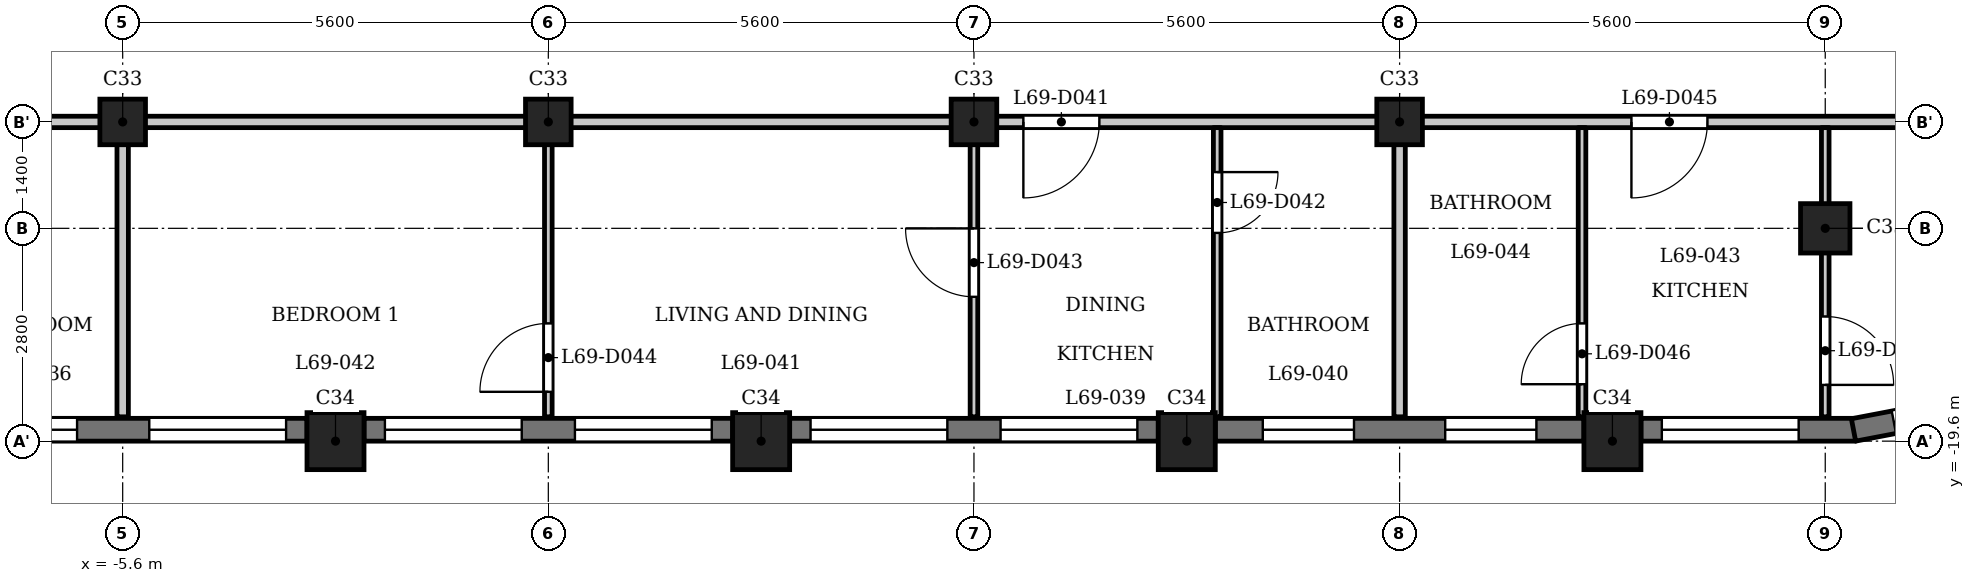
"""IFC4 building model, lengths in metres.
Left out: names, types, materials, properties, quantities, classifications, styles, units other than length and angle.
Written with IfcOpenShell. Run it as: python <this file> out.ifc"""

import sys

from ifc_helpers import new_model, si_unit, direction, frame, frame_2d, origin, origin_2d, place, context, subcontext, project, spatial, rectangle, extrude, element, fill, save


model = new_model("IFC4")
c1 = context("Model", 3, precision=1e-05, world=origin(), true_north=direction((0.0, 1.0)))
c2 = subcontext(c1, "Body", "Model", "MODEL_VIEW")
j1 = project(units=[si_unit("LENGTHUNIT", "METRE"), si_unit("PLANEANGLEUNIT", "RADIAN")], contexts=[c1])
p1 = place(None, origin())
s1 = spatial("IfcSite", under=j1, at=p1, CompositionType="ELEMENT")
p2 = place(p1, origin())
s2 = spatial("IfcBuilding", under=s1, at=p2, CompositionType="ELEMENT")
p3 = place(p2, frame((0.0, 0.0, 266.2)))
s3 = spatial("IfcBuildingStorey", under=s2, at=p3, CompositionType="ELEMENT", Elevation=266.2)
for number, where, z_axis, x_axis in (
    (1, (-2.8, -19.6, 0.0), (0.0, 0.0, 1.0), (1.0, 0.0, 0.0)),
    (2, (2.8, -19.6, 0.0), (0.0, 0.0, 1.0), (1.0, 0.0, 0.0)),
    (3, (8.4, -19.6, 0.0), (0.0, 0.0, 1.0), (1.0, 0.0, 0.0)),
    (4, (14.0, -19.6, 0.0), (0.0, 0.0, 1.0), (1.0, 0.0, 0.0)),
):
    element("IfcColumn", number, at=place(p3, frame(where, z_axis=z_axis, x_axis=x_axis)), inside=s3, PredefinedType="COLUMN", context=c2, shape_type="SweptSolid", body=[
        extrude(rectangle(XDim=0.75, YDim=0.75, at=origin_2d()), origin(), (0.0, 0.0, 1.0), 3.5),
    ])
p4 = place(p3, frame((16.8, -16.8, 0.0), z_axis=(0.0, 0.0, 1.0), x_axis=(1.0, 0.0, 0.0)))
e5 = element("IfcColumn", 5, at=p4, inside=s3, PredefinedType="COLUMN", context=c2, shape_type="SweptSolid", body=[
    extrude(rectangle(XDim=0.65, YDim=0.65, at=origin_2d()), origin(), (0.0, 0.0, 1.0), 3.5),
])
for number, where, z_axis, x_axis in (
    (6, (-5.6, -15.4, 0.0), (0.0, 0.0, 1.0), (1.0, 0.0, 0.0)),
    (7, (0.0, -15.4, 0.0), (0.0, 0.0, 1.0), (1.0, 0.0, 0.0)),
    (8, (5.6, -15.4, 0.0), (0.0, 0.0, 1.0), (1.0, 0.0, 0.0)),
    (9, (11.2, -15.4, 0.0), (0.0, 0.0, 1.0), (1.0, 0.0, 0.0)),
):
    element("IfcColumn", number, at=place(p3, frame(where, z_axis=z_axis, x_axis=x_axis)), inside=s3, PredefinedType="COLUMN", context=c2, shape_type="SweptSolid", body=[
        extrude(rectangle(XDim=0.6, YDim=0.6, at=origin_2d()), origin(), (0.0, 0.0, 1.0), 3.5),
    ])
p5 = place(p3, frame((-8.025, -19.45, 0.0), z_axis=(0.0, 0.0, 1.0), x_axis=(1.0, 0.0, 0.0)))
e10 = element("IfcWall", 10, at=p5, inside=s3, PredefinedType="SOLIDWALL", context=c2, shape_type="SweptSolid", body=[
    extrude(rectangle(XDim=4.85, YDim=0.3, at=frame_2d((2.425, 0.0))), origin(), (0.0, 0.0, 1.0), 2.55),
])
p6 = place(p5, frame((0.625, 0.0, 0.6)))
e11 = element("IfcOpeningElement", 11, at=p6, cuts=e10, PredefinedType="OPENING", context=c2, shape_type="SweptSolid", body=[
    extrude(rectangle(XDim=1.2, YDim=1.55, at=frame_2d((0.6, 0.775))), frame((0.0, 0.16, 0.0), z_axis=(0.0, -1.0, 0.0), x_axis=(1.0, 0.0, 0.0)), (0.0, 0.0, 1.0), 0.32),
])
p7 = place(p5, frame((2.775, 0.0, 0.9)))
e12 = element("IfcOpeningElement", 12, at=p7, cuts=e10, PredefinedType="OPENING", context=c2, shape_type="SweptSolid", body=[
    extrude(rectangle(XDim=1.8, YDim=1.25, at=frame_2d((0.9, 0.625))), frame((0.0, 0.16, 0.0), z_axis=(0.0, -1.0, 0.0), x_axis=(1.0, 0.0, 0.0)), (0.0, 0.0, 1.0), 0.32),
])
p8 = place(p3, frame((-2.425, -19.45, 0.0), z_axis=(0.0, 0.0, 1.0), x_axis=(1.0, 0.0, 0.0)))
e13 = element("IfcWall", 13, at=p8, inside=s3, PredefinedType="SOLIDWALL", context=c2, shape_type="SweptSolid", body=[
    extrude(rectangle(XDim=4.85, YDim=0.3, at=frame_2d((2.425, 0.0))), origin(), (0.0, 0.0, 1.0), 2.55),
])
p9 = place(p8, frame((0.275, 0.0, 0.9)))
e14 = element("IfcOpeningElement", 14, at=p9, cuts=e13, PredefinedType="OPENING", context=c2, shape_type="SweptSolid", body=[
    extrude(rectangle(XDim=1.8, YDim=1.25, at=frame_2d((0.9, 0.625))), frame((0.0, 0.16, 0.0), z_axis=(0.0, -1.0, 0.0), x_axis=(1.0, 0.0, 0.0)), (0.0, 0.0, 1.0), 0.32),
])
p10 = place(p8, frame((2.775, 0.0, 0.9)))
e15 = element("IfcOpeningElement", 15, at=p10, cuts=e13, PredefinedType="OPENING", context=c2, shape_type="SweptSolid", body=[
    extrude(rectangle(XDim=1.8, YDim=1.25, at=frame_2d((0.9, 0.625))), frame((0.0, 0.16, 0.0), z_axis=(0.0, -1.0, 0.0), x_axis=(1.0, 0.0, 0.0)), (0.0, 0.0, 1.0), 0.32),
])
p11 = place(p3, frame((3.175, -19.45, 0.0), z_axis=(0.0, 0.0, 1.0), x_axis=(1.0, 0.0, 0.0)))
e16 = element("IfcWall", 16, at=p11, inside=s3, PredefinedType="SOLIDWALL", context=c2, shape_type="SweptSolid", body=[
    extrude(rectangle(XDim=4.85, YDim=0.3, at=frame_2d((2.425, 0.0))), origin(), (0.0, 0.0, 1.0), 2.55),
])
p12 = place(p11, frame((0.275, 0.0, 0.9)))
e17 = element("IfcOpeningElement", 17, at=p12, cuts=e16, PredefinedType="OPENING", context=c2, shape_type="SweptSolid", body=[
    extrude(rectangle(XDim=1.8, YDim=1.25, at=frame_2d((0.9, 0.625))), frame((0.0, 0.16, 0.0), z_axis=(0.0, -1.0, 0.0), x_axis=(1.0, 0.0, 0.0)), (0.0, 0.0, 1.0), 0.32),
])
p13 = place(p11, frame((2.775, 0.0, 0.9)))
e18 = element("IfcOpeningElement", 18, at=p13, cuts=e16, PredefinedType="OPENING", context=c2, shape_type="SweptSolid", body=[
    extrude(rectangle(XDim=1.8, YDim=1.25, at=frame_2d((0.9, 0.625))), frame((0.0, 0.16, 0.0), z_axis=(0.0, -1.0, 0.0), x_axis=(1.0, 0.0, 0.0)), (0.0, 0.0, 1.0), 0.32),
])
p14 = place(p3, frame((8.775, -19.45, 0.0), z_axis=(0.0, 0.0, 1.0), x_axis=(1.0, 0.0, 0.0)))
e19 = element("IfcWall", 19, at=p14, inside=s3, PredefinedType="SOLIDWALL", context=c2, shape_type="SweptSolid", body=[
    extrude(rectangle(XDim=4.85, YDim=0.3, at=frame_2d((2.425, 0.0))), origin(), (0.0, 0.0, 1.0), 2.55),
])
p15 = place(p14, frame((0.625, 0.0, 0.6)))
e20 = element("IfcOpeningElement", 20, at=p15, cuts=e19, PredefinedType="OPENING", context=c2, shape_type="SweptSolid", body=[
    extrude(rectangle(XDim=1.2, YDim=1.55, at=frame_2d((0.6, 0.775))), frame((0.0, 0.16, 0.0), z_axis=(0.0, -1.0, 0.0), x_axis=(1.0, 0.0, 0.0)), (0.0, 0.0, 1.0), 0.32),
])
p16 = place(p14, frame((3.025, 0.0, 0.6)))
e21 = element("IfcOpeningElement", 21, at=p16, cuts=e19, PredefinedType="OPENING", context=c2, shape_type="SweptSolid", body=[
    extrude(rectangle(XDim=1.2, YDim=1.55, at=frame_2d((0.6, 0.775))), frame((0.0, 0.16, 0.0), z_axis=(0.0, -1.0, 0.0), x_axis=(1.0, 0.0, 0.0)), (0.0, 0.0, 1.0), 0.32),
])
p17 = place(p3, frame((14.375, -19.45, 0.0), z_axis=(0.0, 0.0, 1.0), x_axis=(1.0, 0.0, 0.0)))
e22 = element("IfcWall", 22, at=p17, inside=s3, PredefinedType="SOLIDWALL", context=c2, shape_type="SweptSolid", body=[
    extrude(rectangle(XDim=2.825, YDim=0.3, at=frame_2d((1.413, 0.0))), origin(), (0.0, 0.0, 1.0), 2.55),
])
p18 = place(p17, frame((0.275, 0.0, 0.9)))
e23 = element("IfcOpeningElement", 23, at=p18, cuts=e22, PredefinedType="OPENING", context=c2, shape_type="SweptSolid", body=[
    extrude(rectangle(XDim=1.8, YDim=1.25, at=frame_2d((0.9, 0.625))), frame((0.0, 0.16, 0.0), z_axis=(0.0, -1.0, 0.0), x_axis=(1.0, 0.0, 0.0)), (0.0, 0.0, 1.0), 0.32),
])
p19 = place(p3, frame((17.172, -19.453, 0.0), z_axis=(0.0, 0.0, 1.0), x_axis=(0.982284001233, 0.187398348234, 0.0)))
e24 = element("IfcWall", 24, at=p19, inside=s3, PredefinedType="SOLIDWALL", context=c2, shape_type="SweptSolid", body=[
    extrude(rectangle(XDim=1.881, YDim=0.3, at=frame_2d((0.941, 0.0))), origin(), (0.0, 0.0, 1.0), 2.55),
])
p20 = place(p19, frame((0.541, 0.0, 0.6)))
e25 = element("IfcOpeningElement", 25, at=p20, cuts=e24, PredefinedType="OPENING", context=c2, shape_type="SweptSolid", body=[
    extrude(rectangle(XDim=0.8, YDim=1.55, at=frame_2d((0.4, 0.775))), frame((0.0, 0.16, 0.0), z_axis=(0.0, -1.0, 0.0), x_axis=(1.0, 0.0, 0.0)), (0.0, 0.0, 1.0), 0.32),
])
p21 = place(p3, frame((-23.322, -15.4, 0.0), z_axis=(0.0, 0.0, 1.0), x_axis=(1.0, 0.0, 0.0)))
e26 = element("IfcWall", 26, at=p21, inside=s3, PredefinedType="PARTITIONING", context=c2, shape_type="SweptSolid", body=[
    extrude(rectangle(XDim=46.872, YDim=0.15, at=frame_2d((23.436, 0.0))), origin(), (0.0, 0.0, 1.0), 3.2),
])
p22 = place(p21, frame((12.772, 0.0, 0.0)))
e27 = element("IfcOpeningElement", 27, at=p22, cuts=e26, PredefinedType="OPENING", context=c2, shape_type="SweptSolid", body=[
    extrude(rectangle(XDim=1.0, YDim=2.1, at=frame_2d((0.5, 1.05))), frame((0.0, 0.085, 0.0), z_axis=(0.0, -1.0, 0.0), x_axis=(1.0, 0.0, 0.0)), (0.0, 0.0, 1.0), 0.17),
])
p23 = place(p21, frame((29.572, 0.0, 0.0)))
e28 = element("IfcOpeningElement", 28, at=p23, cuts=e26, PredefinedType="OPENING", context=c2, shape_type="SweptSolid", body=[
    extrude(rectangle(XDim=1.0, YDim=2.1, at=frame_2d((0.5, 1.05))), frame((0.0, 0.085, 0.0), z_axis=(0.0, -1.0, 0.0), x_axis=(1.0, 0.0, 0.0)), (0.0, 0.0, 1.0), 0.17),
])
p24 = place(p21, frame((37.572, 0.0, 0.0)))
e29 = element("IfcOpeningElement", 29, at=p24, cuts=e26, PredefinedType="OPENING", context=c2, shape_type="SweptSolid", body=[
    extrude(rectangle(XDim=1.0, YDim=2.1, at=frame_2d((0.5, 1.05))), frame((0.0, 0.085, 0.0), z_axis=(0.0, -1.0, 0.0), x_axis=(1.0, 0.0, 0.0)), (0.0, 0.0, 1.0), 0.17),
])
p25 = place(p3, frame((-5.6, -19.28, 0.0), z_axis=(0.0, 0.0, 1.0), x_axis=(0.0, 1.0, 0.0)))
e30 = element("IfcWall", 30, at=p25, inside=s3, PredefinedType="PARTITIONING", context=c2, shape_type="SweptSolid", body=[
    extrude(rectangle(XDim=3.805, YDim=0.15, at=frame_2d((1.902, 0.0))), origin(), (0.0, 0.0, 1.0), 3.2),
])
p26 = place(p3, frame((0.0, -19.28, 0.0), z_axis=(0.0, 0.0, 1.0), x_axis=(0.0, 1.0, 0.0)))
e31 = element("IfcWall", 31, at=p26, inside=s3, PredefinedType="PARTITIONING", context=c2, shape_type="SweptSolid", body=[
    extrude(rectangle(XDim=3.805, YDim=0.1, at=frame_2d((1.902, 0.0))), origin(), (0.0, 0.0, 1.0), 3.2),
])
p27 = place(p26, frame((0.329, 0.0, 0.0)))
e32 = element("IfcOpeningElement", 32, at=p27, cuts=e31, PredefinedType="OPENING", context=c2, shape_type="SweptSolid", body=[
    extrude(rectangle(XDim=0.9, YDim=2.1, at=frame_2d((0.45, 1.05))), frame((0.0, 0.06, 0.0), z_axis=(0.0, -1.0, 0.0), x_axis=(1.0, 0.0, 0.0)), (0.0, 0.0, 1.0), 0.12),
])
p28 = place(p3, frame((5.6, -19.28, 0.0), z_axis=(0.0, 0.0, 1.0), x_axis=(0.0, 1.0, 0.0)))
e33 = element("IfcWall", 33, at=p28, inside=s3, PredefinedType="PARTITIONING", context=c2, shape_type="SweptSolid", body=[
    extrude(rectangle(XDim=3.805, YDim=0.1, at=frame_2d((1.902, 0.0))), origin(), (0.0, 0.0, 1.0), 3.2),
])
p29 = place(p28, frame((1.579, 0.0, 0.0)))
e34 = element("IfcOpeningElement", 34, at=p29, cuts=e33, PredefinedType="OPENING", context=c2, shape_type="SweptSolid", body=[
    extrude(rectangle(XDim=0.9, YDim=2.1, at=frame_2d((0.45, 1.05))), frame((0.0, 0.06, 0.0), z_axis=(0.0, -1.0, 0.0), x_axis=(1.0, 0.0, 0.0)), (0.0, 0.0, 1.0), 0.12),
])
p30 = place(p3, frame((8.8, -19.28, 0.0), z_axis=(0.0, 0.0, 1.0), x_axis=(0.0, 1.0, 0.0)))
e35 = element("IfcWall", 35, at=p30, inside=s3, PredefinedType="PARTITIONING", context=c2, shape_type="SweptSolid", body=[
    extrude(rectangle(XDim=3.805, YDim=0.1, at=frame_2d((1.902, 0.0))), origin(), (0.0, 0.0, 1.0), 3.2),
])
p31 = place(p30, frame((2.42, 0.0, 0.0)))
e36 = element("IfcOpeningElement", 36, at=p31, cuts=e35, PredefinedType="OPENING", context=c2, shape_type="SweptSolid", body=[
    extrude(rectangle(XDim=0.8, YDim=2.1, at=frame_2d((0.4, 1.05))), frame((0.0, 0.06, 0.0), z_axis=(0.0, -1.0, 0.0), x_axis=(1.0, 0.0, 0.0)), (0.0, 0.0, 1.0), 0.12),
])
p32 = place(p3, frame((11.2, -19.28, 0.0), z_axis=(0.0, 0.0, 1.0), x_axis=(0.0, 1.0, 0.0)))
e37 = element("IfcWall", 37, at=p32, inside=s3, PredefinedType="PARTITIONING", context=c2, shape_type="SweptSolid", body=[
    extrude(rectangle(XDim=3.805, YDim=0.15, at=frame_2d((1.902, 0.0))), origin(), (0.0, 0.0, 1.0), 3.2),
])
p33 = place(p3, frame((13.6, -19.28, 0.0), z_axis=(0.0, 0.0, 1.0), x_axis=(0.0, 1.0, 0.0)))
e38 = element("IfcWall", 38, at=p33, inside=s3, PredefinedType="PARTITIONING", context=c2, shape_type="SweptSolid", body=[
    extrude(rectangle(XDim=3.805, YDim=0.1, at=frame_2d((1.902, 0.0))), origin(), (0.0, 0.0, 1.0), 3.2),
])
p34 = place(p33, frame((0.429, 0.0, 0.0)))
e39 = element("IfcOpeningElement", 39, at=p34, cuts=e38, PredefinedType="OPENING", context=c2, shape_type="SweptSolid", body=[
    extrude(rectangle(XDim=0.8, YDim=2.1, at=frame_2d((0.4, 1.05))), frame((0.0, 0.06, 0.0), z_axis=(0.0, -1.0, 0.0), x_axis=(1.0, 0.0, 0.0)), (0.0, 0.0, 1.0), 0.12),
])
p35 = place(p3, frame((16.8, -19.28, 0.0), z_axis=(0.0, 0.0, 1.0), x_axis=(0.0, 1.0, 0.0)))
e40 = element("IfcWall", 40, at=p35, inside=s3, PredefinedType="PARTITIONING", context=c2, shape_type="SweptSolid", body=[
    extrude(rectangle(XDim=3.805, YDim=0.1, at=frame_2d((1.902, 0.0))), origin(), (0.0, 0.0, 1.0), 3.2),
])
p36 = place(p35, frame((0.42, 0.0, 0.0)))
e41 = element("IfcOpeningElement", 41, at=p36, cuts=e40, PredefinedType="OPENING", context=c2, shape_type="SweptSolid", body=[
    extrude(rectangle(XDim=0.9, YDim=2.1, at=frame_2d((0.45, 1.05))), frame((0.0, 0.06, 0.0), z_axis=(0.0, -1.0, 0.0), x_axis=(1.0, 0.0, 0.0)), (0.0, 0.0, 1.0), 0.12),
])
p37 = place(p23, origin())
e42 = element("IfcDoor", 42, at=p37, inside=s3, OperationType="SINGLE_SWING_LEFT", PredefinedType="DOOR", context=c2, shape_type="SweptSolid", body=[
    extrude(rectangle(XDim=1.0, YDim=2.1, at=frame_2d((0.5, 1.05))), frame((0.0, 0.025, 0.0), z_axis=(0.0, -1.0, 0.0), x_axis=(1.0, 0.0, 0.0)), (0.0, 0.0, 1.0), 0.05),
])
fill(e28, e42)
p38 = place(p31, origin())
e43 = element("IfcDoor", 43, at=p38, inside=s3, OperationType="SINGLE_SWING_RIGHT", PredefinedType="DOOR", context=c2, shape_type="SweptSolid", body=[
    extrude(rectangle(XDim=0.8, YDim=2.1, at=frame_2d((0.4, 1.05))), frame((0.0, 0.025, 0.0), z_axis=(0.0, -1.0, 0.0), x_axis=(1.0, 0.0, 0.0)), (0.0, 0.0, 1.0), 0.05),
])
fill(e36, e43)
p39 = place(p29, origin())
e44 = element("IfcDoor", 44, at=p39, inside=s3, OperationType="SINGLE_SWING_LEFT", PredefinedType="DOOR", context=c2, shape_type="SweptSolid", body=[
    extrude(rectangle(XDim=0.9, YDim=2.1, at=frame_2d((0.45, 1.05))), frame((0.0, 0.025, 0.0), z_axis=(0.0, -1.0, 0.0), x_axis=(1.0, 0.0, 0.0)), (0.0, 0.0, 1.0), 0.05),
])
fill(e34, e44)
p40 = place(p27, origin())
e45 = element("IfcDoor", 45, at=p40, inside=s3, OperationType="SINGLE_SWING_RIGHT", PredefinedType="DOOR", context=c2, shape_type="SweptSolid", body=[
    extrude(rectangle(XDim=0.9, YDim=2.1, at=frame_2d((0.45, 1.05))), frame((0.0, 0.025, 0.0), z_axis=(0.0, -1.0, 0.0), x_axis=(1.0, 0.0, 0.0)), (0.0, 0.0, 1.0), 0.05),
])
fill(e32, e45)
p41 = place(p24, origin())
e46 = element("IfcDoor", 46, at=p41, inside=s3, OperationType="SINGLE_SWING_LEFT", PredefinedType="DOOR", context=c2, shape_type="SweptSolid", body=[
    extrude(rectangle(XDim=1.0, YDim=2.1, at=frame_2d((0.5, 1.05))), frame((0.0, 0.025, 0.0), z_axis=(0.0, -1.0, 0.0), x_axis=(1.0, 0.0, 0.0)), (0.0, 0.0, 1.0), 0.05),
])
fill(e29, e46)
p42 = place(p34, origin())
e47 = element("IfcDoor", 47, at=p42, inside=s3, OperationType="SINGLE_SWING_RIGHT", PredefinedType="DOOR", context=c2, shape_type="SweptSolid", body=[
    extrude(rectangle(XDim=0.8, YDim=2.1, at=frame_2d((0.4, 1.05))), frame((0.0, 0.025, 0.0), z_axis=(0.0, -1.0, 0.0), x_axis=(1.0, 0.0, 0.0)), (0.0, 0.0, 1.0), 0.05),
])
fill(e39, e47)
p43 = place(p36, origin())
e48 = element("IfcDoor", 48, at=p43, inside=s3, OperationType="SINGLE_SWING_LEFT", PredefinedType="DOOR", context=c2, shape_type="SweptSolid", body=[
    extrude(rectangle(XDim=0.9, YDim=2.1, at=frame_2d((0.45, 1.05))), frame((0.0, 0.025, 0.0), z_axis=(0.0, -1.0, 0.0), x_axis=(1.0, 0.0, 0.0)), (0.0, 0.0, 1.0), 0.05),
])
fill(e41, e48)
p44 = place(p6, origin())
e49 = element("IfcWindow", 49, at=p44, inside=s3, PartitioningType="SINGLE_PANEL", PredefinedType="WINDOW", context=c2, shape_type="SweptSolid", body=[
    extrude(rectangle(XDim=1.2, YDim=1.55, at=frame_2d((0.6, 0.775))), frame((0.0, 0.03, 0.0), z_axis=(0.0, -1.0, 0.0), x_axis=(1.0, 0.0, 0.0)), (0.0, 0.0, 1.0), 0.06),
])
fill(e11, e49)
p45 = place(p7, origin())
e50 = element("IfcWindow", 50, at=p45, inside=s3, PartitioningType="SINGLE_PANEL", PredefinedType="WINDOW", context=c2, shape_type="SweptSolid", body=[
    extrude(rectangle(XDim=1.8, YDim=1.25, at=frame_2d((0.9, 0.625))), frame((0.0, 0.03, 0.0), z_axis=(0.0, -1.0, 0.0), x_axis=(1.0, 0.0, 0.0)), (0.0, 0.0, 1.0), 0.06),
])
fill(e12, e50)
p46 = place(p9, origin())
e51 = element("IfcWindow", 51, at=p46, inside=s3, PartitioningType="SINGLE_PANEL", PredefinedType="WINDOW", context=c2, shape_type="SweptSolid", body=[
    extrude(rectangle(XDim=1.8, YDim=1.25, at=frame_2d((0.9, 0.625))), frame((0.0, 0.03, 0.0), z_axis=(0.0, -1.0, 0.0), x_axis=(1.0, 0.0, 0.0)), (0.0, 0.0, 1.0), 0.06),
])
fill(e14, e51)
p47 = place(p10, origin())
e52 = element("IfcWindow", 52, at=p47, inside=s3, PartitioningType="SINGLE_PANEL", PredefinedType="WINDOW", context=c2, shape_type="SweptSolid", body=[
    extrude(rectangle(XDim=1.8, YDim=1.25, at=frame_2d((0.9, 0.625))), frame((0.0, 0.03, 0.0), z_axis=(0.0, -1.0, 0.0), x_axis=(1.0, 0.0, 0.0)), (0.0, 0.0, 1.0), 0.06),
])
fill(e15, e52)
p48 = place(p12, origin())
e53 = element("IfcWindow", 53, at=p48, inside=s3, PartitioningType="SINGLE_PANEL", PredefinedType="WINDOW", context=c2, shape_type="SweptSolid", body=[
    extrude(rectangle(XDim=1.8, YDim=1.25, at=frame_2d((0.9, 0.625))), frame((0.0, 0.03, 0.0), z_axis=(0.0, -1.0, 0.0), x_axis=(1.0, 0.0, 0.0)), (0.0, 0.0, 1.0), 0.06),
])
fill(e17, e53)
p49 = place(p13, origin())
e54 = element("IfcWindow", 54, at=p49, inside=s3, PartitioningType="SINGLE_PANEL", PredefinedType="WINDOW", context=c2, shape_type="SweptSolid", body=[
    extrude(rectangle(XDim=1.8, YDim=1.25, at=frame_2d((0.9, 0.625))), frame((0.0, 0.03, 0.0), z_axis=(0.0, -1.0, 0.0), x_axis=(1.0, 0.0, 0.0)), (0.0, 0.0, 1.0), 0.06),
])
fill(e18, e54)
p50 = place(p15, origin())
e55 = element("IfcWindow", 55, at=p50, inside=s3, PartitioningType="SINGLE_PANEL", PredefinedType="WINDOW", context=c2, shape_type="SweptSolid", body=[
    extrude(rectangle(XDim=1.2, YDim=1.55, at=frame_2d((0.6, 0.775))), frame((0.0, 0.03, 0.0), z_axis=(0.0, -1.0, 0.0), x_axis=(1.0, 0.0, 0.0)), (0.0, 0.0, 1.0), 0.06),
])
fill(e20, e55)
p51 = place(p16, origin())
e56 = element("IfcWindow", 56, at=p51, inside=s3, PartitioningType="SINGLE_PANEL", PredefinedType="WINDOW", context=c2, shape_type="SweptSolid", body=[
    extrude(rectangle(XDim=1.2, YDim=1.55, at=frame_2d((0.6, 0.775))), frame((0.0, 0.03, 0.0), z_axis=(0.0, -1.0, 0.0), x_axis=(1.0, 0.0, 0.0)), (0.0, 0.0, 1.0), 0.06),
])
fill(e21, e56)
p52 = place(p18, origin())
e57 = element("IfcWindow", 57, at=p52, inside=s3, PartitioningType="SINGLE_PANEL", PredefinedType="WINDOW", context=c2, shape_type="SweptSolid", body=[
    extrude(rectangle(XDim=1.8, YDim=1.25, at=frame_2d((0.9, 0.625))), frame((0.0, 0.03, 0.0), z_axis=(0.0, -1.0, 0.0), x_axis=(1.0, 0.0, 0.0)), (0.0, 0.0, 1.0), 0.06),
])
fill(e23, e57)
p53 = place(p20, origin())
e58 = element("IfcWindow", 58, at=p53, inside=s3, PartitioningType="SINGLE_PANEL", PredefinedType="WINDOW", context=c2, shape_type="SweptSolid", body=[
    extrude(rectangle(XDim=0.8, YDim=1.55, at=frame_2d((0.4, 0.775))), frame((0.0, 0.03, 0.0), z_axis=(0.0, -1.0, 0.0), x_axis=(1.0, 0.0, 0.0)), (0.0, 0.0, 1.0), 0.06),
])
fill(e25, e58)
save(model, sys.argv[1])
